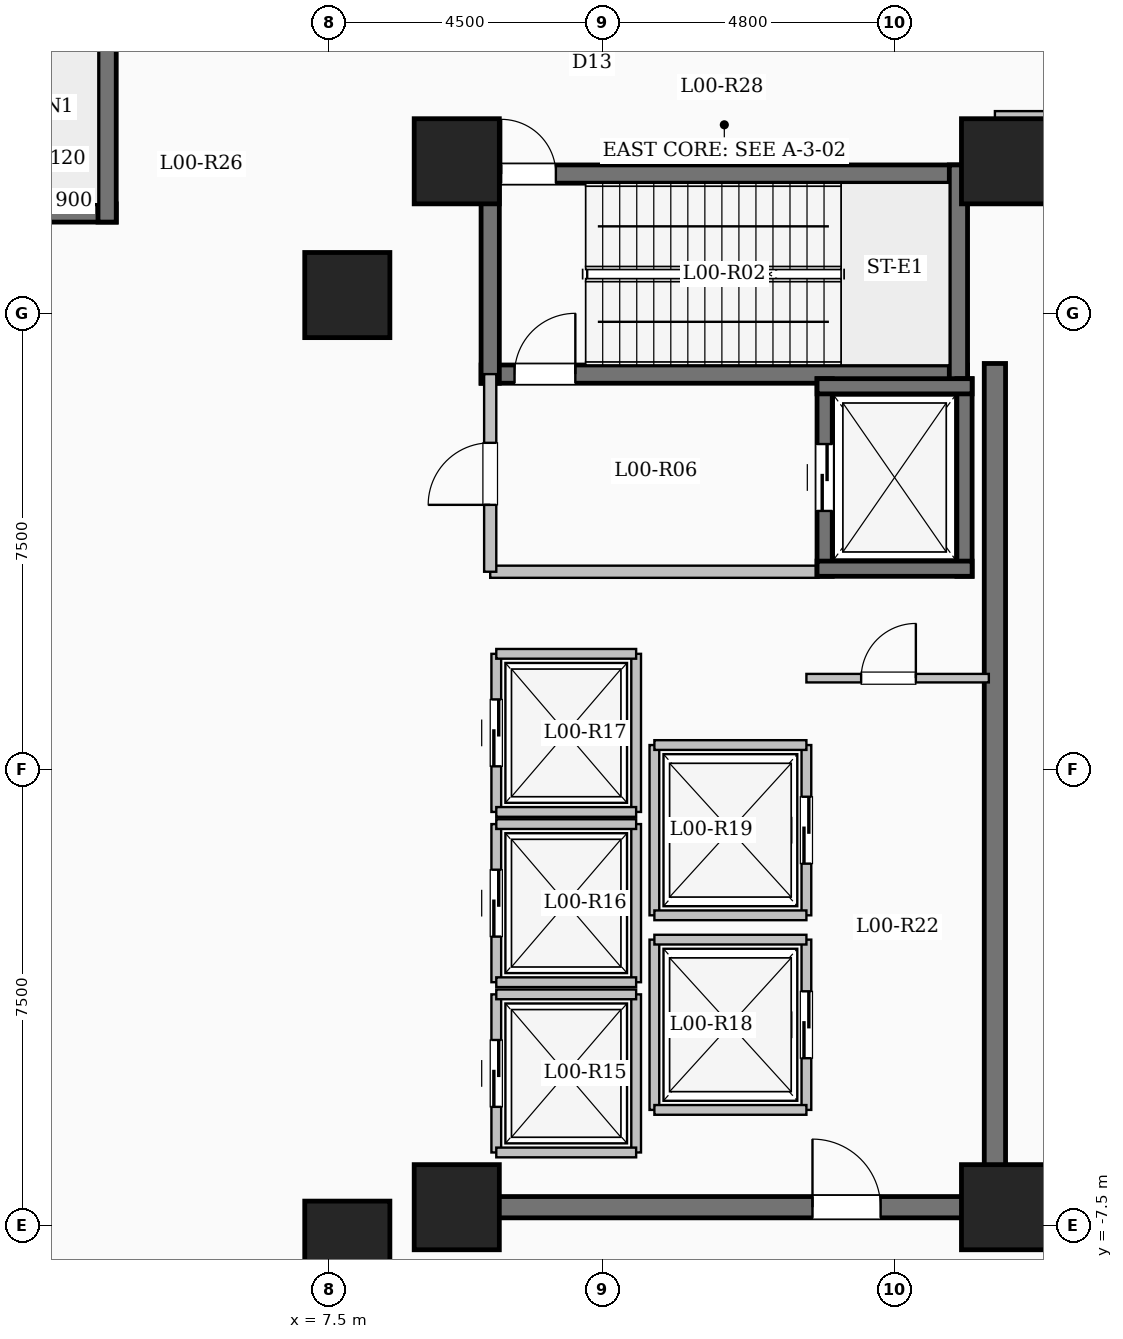
"""IFC4 building model, lengths in metres.
Left out: names, types, materials, properties, quantities, classifications, styles, units other than length and angle.
Written with IfcOpenShell. Run it as: python <this file> out.ifc"""

import sys

from ifc_helpers import new_model, si_unit, direction, frame, frame_2d, origin, origin_2d, place, context, subcontext, project, spatial, rectangle, extrude, element, fill, save


model = new_model("IFC4")
c1 = context("Model", 3, precision=1e-05, world=origin(), true_north=direction((0.0, 1.0)))
c2 = subcontext(c1, "Body", "Model", "MODEL_VIEW")
j1 = project(units=[si_unit("LENGTHUNIT", "METRE"), si_unit("PLANEANGLEUNIT", "RADIAN")], contexts=[c1])
p1 = place(None, origin())
s1 = spatial("IfcSite", under=j1, at=p1, CompositionType="ELEMENT")
p2 = place(p1, origin())
s2 = spatial("IfcBuilding", under=s1, at=p2, CompositionType="ELEMENT")
p3 = place(p2, origin())
s3 = spatial("IfcBuildingStorey", under=s2, at=p3, CompositionType="ELEMENT", Elevation=0.0)
for number, where, z_axis, x_axis in (
    (1, (7.8, -7.8, 0.0), (0.0, 0.0, 1.0), (1.0, 0.0, 0.0)),
    (2, (7.8, 7.8, 0.0), (0.0, 0.0, 1.0), (1.0, 0.0, 0.0)),
    (3, (9.6, -7.2, 0.0), (0.0, 0.0, 1.0), (1.0, 0.0, 0.0)),
    (4, (9.6, 10.0, 0.0), (0.0, 0.0, 1.0), (1.0, 0.0, 0.0)),
    (5, (18.6, -7.2, 0.0), (0.0, 0.0, 1.0), (1.0, 0.0, 0.0)),
    (6, (18.6, 10.0, 0.0), (0.0, 0.0, 1.0), (1.0, 0.0, 0.0)),
):
    element("IfcColumn", number, at=place(p3, frame(where, z_axis=z_axis, x_axis=x_axis)), inside=s3, PredefinedType="COLUMN", context=c2, shape_type="SweptSolid", body=[
        extrude(rectangle(XDim=1.4, YDim=1.4, at=origin_2d()), origin(), (0.0, 0.0, 1.0), 5.4),
    ])
p4 = place(p3, frame((10.0, 9.79, 0.0), z_axis=(0.0, 0.0, 1.0), x_axis=(1.0, 0.0, 0.0)))
e7 = element("IfcWall", 7, at=p4, inside=s3, PredefinedType="SHEAR", context=c2, shape_type="SweptSolid", body=[
    extrude(rectangle(XDim=8.0, YDim=0.3, at=frame_2d((4.0, 0.0))), origin(), (0.0, 0.0, 1.0), 5.4),
])
p5 = place(p4, frame((0.33, 0.0, 0.0)))
e8 = element("IfcOpeningElement", 8, at=p5, cuts=e7, PredefinedType="OPENING", context=c2, shape_type="SweptSolid", body=[
    extrude(rectangle(XDim=0.9, YDim=2.15, at=frame_2d((0.45, 1.075))), frame((0.0, 0.16, 0.0), z_axis=(0.0, -1.0, 0.0), x_axis=(1.0, 0.0, 0.0)), (0.0, 0.0, 1.0), 0.32),
])
p6 = place(p3, frame((10.0, 6.5, 0.0), z_axis=(0.0, 0.0, 1.0), x_axis=(1.0, 0.0, 0.0)))
e9 = element("IfcWall", 9, at=p6, inside=s3, PredefinedType="SHEAR", context=c2, shape_type="SweptSolid", body=[
    extrude(rectangle(XDim=8.0, YDim=0.3, at=frame_2d((4.0, 0.0))), origin(), (0.0, 0.0, 1.0), 5.4),
])
p7 = place(p6, frame((0.55, 0.0, 0.0)))
e10 = element("IfcOpeningElement", 10, at=p7, cuts=e9, PredefinedType="OPENING", context=c2, shape_type="SweptSolid", body=[
    extrude(rectangle(XDim=1.0, YDim=2.15, at=frame_2d((0.5, 1.075))), frame((0.0, 0.16, 0.0), z_axis=(0.0, -1.0, 0.0), x_axis=(1.0, 0.0, 0.0)), (0.0, 0.0, 1.0), 0.32),
])
for number, where, z_axis, x_axis in (
    (11, (10.15, 6.35, 0.0), (0.0, 0.0, 1.0), (0.0, 1.0, 0.0)),
    (12, (17.85, 6.35, 0.0), (0.0, 0.0, 1.0), (0.0, 1.0, 0.0)),
):
    element("IfcWall", number, at=place(p3, frame(where, z_axis=z_axis, x_axis=x_axis)), inside=s3, PredefinedType="SHEAR", context=c2, shape_type="SweptSolid", body=[
        extrude(rectangle(XDim=3.59, YDim=0.3, at=frame_2d((1.795, 0.0))), origin(), (0.0, 0.0, 1.0), 5.4),
    ])
p8 = place(p3, frame((-4.0, 9.15, 0.0), z_axis=(0.0, 0.0, 1.0), x_axis=(1.0, 0.0, 0.0)))
e13 = element("IfcWall", 13, at=p8, inside=s3, PredefinedType="SHEAR", context=c2, shape_type="SweptSolid", body=[
    extrude(rectangle(XDim=8.0, YDim=0.3, at=frame_2d((4.0, 0.0))), origin(), (0.0, 0.0, 1.0), 5.4),
])
p9 = place(p8, frame((0.55, 0.0, 0.0)))
e14 = element("IfcOpeningElement", 14, at=p9, cuts=e13, PredefinedType="OPENING", context=c2, shape_type="SweptSolid", body=[
    extrude(rectangle(XDim=1.0, YDim=2.15, at=frame_2d((0.5, 1.075))), frame((0.0, 0.16, 0.0), z_axis=(0.0, -1.0, 0.0), x_axis=(1.0, 0.0, 0.0)), (0.0, 0.0, 1.0), 0.32),
])
p10 = place(p3, frame((3.85, 9.0, 0.0), z_axis=(0.0, 0.0, 1.0), x_axis=(0.0, 1.0, 0.0)))
e15 = element("IfcWall", 15, at=p10, inside=s3, PredefinedType="SHEAR", context=c2, shape_type="SweptSolid", body=[
    extrude(rectangle(XDim=3.59, YDim=0.3, at=frame_2d((1.795, 0.0))), origin(), (0.0, 0.0, 1.0), 5.4),
])
p11 = place(p3, frame((10.15, 3.25, 0.0), z_axis=(0.0, 0.0, 1.0), x_axis=(1.0, 0.0, 0.0)))
e16 = element("IfcWall", 16, at=p11, inside=s3, PredefinedType="SOLIDWALL", context=c2, shape_type="SweptSolid", body=[
    extrude(rectangle(XDim=5.4, YDim=0.2, at=frame_2d((2.7, 0.0))), origin(), (0.0, 0.0, 1.0), 5.1),
])
p12 = place(p3, frame((10.15, 3.25, 0.0), z_axis=(0.0, 0.0, 1.0), x_axis=(0.0, 1.0, 0.0)))
e17 = element("IfcWall", 17, at=p12, inside=s3, PredefinedType="SOLIDWALL", context=c2, shape_type="SweptSolid", body=[
    extrude(rectangle(XDim=3.25, YDim=0.2, at=frame_2d((1.625, 0.0))), origin(), (0.0, 0.0, 1.0), 5.1),
])
p13 = place(p12, frame((1.1, 0.0, 0.0)))
e18 = element("IfcOpeningElement", 18, at=p13, cuts=e17, PredefinedType="OPENING", context=c2, shape_type="SweptSolid", body=[
    extrude(rectangle(XDim=1.02, YDim=2.15, at=frame_2d((0.51, 1.075))), frame((0.0, 0.11, 0.0), z_axis=(0.0, -1.0, 0.0), x_axis=(1.0, 0.0, 0.0)), (0.0, 0.0, 1.0), 0.22),
])
p14 = place(p3, frame((15.65, 3.175, 0.0), z_axis=(0.0, 0.0, 1.0), x_axis=(0.0, 1.0, 0.0)))
e19 = element("IfcWall", 19, at=p14, inside=s3, PredefinedType="SHEAR", context=c2, shape_type="SweptSolid", body=[
    extrude(rectangle(XDim=3.25, YDim=0.25, at=frame_2d((1.625, 0.0))), origin(), (0.0, 0.0, 1.0), 5.4),
])
p15 = place(p14, frame((1.075, 0.0, 0.0)))
e20 = element("IfcOpeningElement", 20, at=p15, cuts=e19, PredefinedType="OPENING", context=c2, shape_type="SweptSolid", body=[
    extrude(rectangle(XDim=1.1, YDim=2.15, at=frame_2d((0.55, 1.075))), frame((0.0, 0.135, 0.0), z_axis=(0.0, -1.0, 0.0), x_axis=(1.0, 0.0, 0.0)), (0.0, 0.0, 1.0), 0.27),
])
p16 = place(p3, frame((17.95, 3.175, 0.0), z_axis=(0.0, 0.0, 1.0), x_axis=(0.0, 1.0, 0.0)))
e21 = element("IfcWall", 21, at=p16, inside=s3, PredefinedType="SHEAR", context=c2, shape_type="SweptSolid", body=[
    extrude(rectangle(XDim=3.25, YDim=0.25, at=frame_2d((1.625, 0.0))), origin(), (0.0, 0.0, 1.0), 5.4),
])
for number, where, z_axis, x_axis in (
    (22, (15.525, 3.3, 0.0), (0.0, 0.0, 1.0), (1.0, 0.0, 0.0)),
    (23, (15.525, 6.3, 0.0), (0.0, 0.0, 1.0), (1.0, 0.0, 0.0)),
):
    element("IfcWall", number, at=place(p3, frame(where, z_axis=z_axis, x_axis=x_axis)), inside=s3, PredefinedType="SHEAR", context=c2, shape_type="SweptSolid", body=[
        extrude(rectangle(XDim=2.55, YDim=0.25, at=frame_2d((1.275, 0.0))), origin(), (0.0, 0.0, 1.0), 5.4),
    ])
p17 = place(p3, frame((10.25, -6.3, 0.0), z_axis=(0.0, 0.0, 1.0), x_axis=(0.0, 1.0, 0.0)))
e24 = element("IfcWall", 24, at=p17, inside=s3, PredefinedType="SOLIDWALL", context=c2, shape_type="SweptSolid", body=[
    extrude(rectangle(XDim=2.6, YDim=0.16, at=frame_2d((1.3, 0.0))), origin(), (0.0, 0.0, 1.0), 5.1),
])
p18 = place(p17, frame((0.75, 0.0, 0.0)))
e25 = element("IfcOpeningElement", 25, at=p18, cuts=e24, PredefinedType="OPENING", context=c2, shape_type="SweptSolid", body=[
    extrude(rectangle(XDim=1.1, YDim=2.15, at=frame_2d((0.55, 1.075))), frame((0.0, 0.09, 0.0), z_axis=(0.0, -1.0, 0.0), x_axis=(1.0, 0.0, 0.0)), (0.0, 0.0, 1.0), 0.18),
])
p19 = place(p3, frame((12.55, -6.3, 0.0), z_axis=(0.0, 0.0, 1.0), x_axis=(0.0, 1.0, 0.0)))
e26 = element("IfcWall", 26, at=p19, inside=s3, PredefinedType="SOLIDWALL", context=c2, shape_type="SweptSolid", body=[
    extrude(rectangle(XDim=2.6, YDim=0.16, at=frame_2d((1.3, 0.0))), origin(), (0.0, 0.0, 1.0), 5.1),
])
for number, where, z_axis, x_axis in (
    (27, (10.25, -6.3, 0.0), (0.0, 0.0, 1.0), (1.0, 0.0, 0.0)),
    (28, (10.25, -3.7, 0.0), (0.0, 0.0, 1.0), (1.0, 0.0, 0.0)),
):
    element("IfcWall", number, at=place(p3, frame(where, z_axis=z_axis, x_axis=x_axis)), inside=s3, PredefinedType="SOLIDWALL", context=c2, shape_type="SweptSolid", body=[
        extrude(rectangle(XDim=2.3, YDim=0.16, at=frame_2d((1.15, 0.0))), origin(), (0.0, 0.0, 1.0), 5.1),
    ])
p20 = place(p3, frame((10.25, -3.5, 0.0), z_axis=(0.0, 0.0, 1.0), x_axis=(0.0, 1.0, 0.0)))
e29 = element("IfcWall", 29, at=p20, inside=s3, PredefinedType="SOLIDWALL", context=c2, shape_type="SweptSolid", body=[
    extrude(rectangle(XDim=2.6, YDim=0.16, at=frame_2d((1.3, 0.0))), origin(), (0.0, 0.0, 1.0), 5.1),
])
p21 = place(p20, frame((0.75, 0.0, 0.0)))
e30 = element("IfcOpeningElement", 30, at=p21, cuts=e29, PredefinedType="OPENING", context=c2, shape_type="SweptSolid", body=[
    extrude(rectangle(XDim=1.1, YDim=2.15, at=frame_2d((0.55, 1.075))), frame((0.0, 0.09, 0.0), z_axis=(0.0, -1.0, 0.0), x_axis=(1.0, 0.0, 0.0)), (0.0, 0.0, 1.0), 0.18),
])
p22 = place(p3, frame((12.55, -3.5, 0.0), z_axis=(0.0, 0.0, 1.0), x_axis=(0.0, 1.0, 0.0)))
e31 = element("IfcWall", 31, at=p22, inside=s3, PredefinedType="SOLIDWALL", context=c2, shape_type="SweptSolid", body=[
    extrude(rectangle(XDim=2.6, YDim=0.16, at=frame_2d((1.3, 0.0))), origin(), (0.0, 0.0, 1.0), 5.1),
])
for number, where, z_axis, x_axis in (
    (32, (10.25, -3.5, 0.0), (0.0, 0.0, 1.0), (1.0, 0.0, 0.0)),
    (33, (10.25, -0.9, 0.0), (0.0, 0.0, 1.0), (1.0, 0.0, 0.0)),
):
    element("IfcWall", number, at=place(p3, frame(where, z_axis=z_axis, x_axis=x_axis)), inside=s3, PredefinedType="SOLIDWALL", context=c2, shape_type="SweptSolid", body=[
        extrude(rectangle(XDim=2.3, YDim=0.16, at=frame_2d((1.15, 0.0))), origin(), (0.0, 0.0, 1.0), 5.1),
    ])
p23 = place(p3, frame((10.25, -0.7, 0.0), z_axis=(0.0, 0.0, 1.0), x_axis=(0.0, 1.0, 0.0)))
e34 = element("IfcWall", 34, at=p23, inside=s3, PredefinedType="SOLIDWALL", context=c2, shape_type="SweptSolid", body=[
    extrude(rectangle(XDim=2.6, YDim=0.16, at=frame_2d((1.3, 0.0))), origin(), (0.0, 0.0, 1.0), 5.1),
])
p24 = place(p23, frame((0.75, 0.0, 0.0)))
e35 = element("IfcOpeningElement", 35, at=p24, cuts=e34, PredefinedType="OPENING", context=c2, shape_type="SweptSolid", body=[
    extrude(rectangle(XDim=1.1, YDim=2.15, at=frame_2d((0.55, 1.075))), frame((0.0, 0.09, 0.0), z_axis=(0.0, -1.0, 0.0), x_axis=(1.0, 0.0, 0.0)), (0.0, 0.0, 1.0), 0.18),
])
p25 = place(p3, frame((12.55, -0.7, 0.0), z_axis=(0.0, 0.0, 1.0), x_axis=(0.0, 1.0, 0.0)))
e36 = element("IfcWall", 36, at=p25, inside=s3, PredefinedType="SOLIDWALL", context=c2, shape_type="SweptSolid", body=[
    extrude(rectangle(XDim=2.6, YDim=0.16, at=frame_2d((1.3, 0.0))), origin(), (0.0, 0.0, 1.0), 5.1),
])
for number, where, z_axis, x_axis in (
    (37, (10.25, -0.7, 0.0), (0.0, 0.0, 1.0), (1.0, 0.0, 0.0)),
    (38, (10.25, 1.9, 0.0), (0.0, 0.0, 1.0), (1.0, 0.0, 0.0)),
):
    element("IfcWall", number, at=place(p3, frame(where, z_axis=z_axis, x_axis=x_axis)), inside=s3, PredefinedType="SOLIDWALL", context=c2, shape_type="SweptSolid", body=[
        extrude(rectangle(XDim=2.3, YDim=0.16, at=frame_2d((1.15, 0.0))), origin(), (0.0, 0.0, 1.0), 5.1),
    ])
p26 = place(p3, frame((12.85, -5.6, 0.0), z_axis=(0.0, 0.0, 1.0), x_axis=(0.0, 1.0, 0.0)))
e39 = element("IfcWall", 39, at=p26, inside=s3, PredefinedType="SOLIDWALL", context=c2, shape_type="SweptSolid", body=[
    extrude(rectangle(XDim=2.8, YDim=0.16, at=frame_2d((1.4, 0.0))), origin(), (0.0, 0.0, 1.0), 5.1),
])
p27 = place(p3, frame((15.35, -5.6, 0.0), z_axis=(0.0, 0.0, 1.0), x_axis=(0.0, 1.0, 0.0)))
e40 = element("IfcWall", 40, at=p27, inside=s3, PredefinedType="SOLIDWALL", context=c2, shape_type="SweptSolid", body=[
    extrude(rectangle(XDim=2.8, YDim=0.16, at=frame_2d((1.4, 0.0))), origin(), (0.0, 0.0, 1.0), 5.1),
])
p28 = place(p27, frame((0.85, 0.0, 0.0)))
e41 = element("IfcOpeningElement", 41, at=p28, cuts=e40, PredefinedType="OPENING", context=c2, shape_type="SweptSolid", body=[
    extrude(rectangle(XDim=1.1, YDim=2.15, at=frame_2d((0.55, 1.075))), frame((0.0, 0.09, 0.0), z_axis=(0.0, -1.0, 0.0), x_axis=(1.0, 0.0, 0.0)), (0.0, 0.0, 1.0), 0.18),
])
for number, where, z_axis, x_axis in (
    (42, (12.85, -5.6, 0.0), (0.0, 0.0, 1.0), (1.0, 0.0, 0.0)),
    (43, (12.85, -2.8, 0.0), (0.0, 0.0, 1.0), (1.0, 0.0, 0.0)),
):
    element("IfcWall", number, at=place(p3, frame(where, z_axis=z_axis, x_axis=x_axis)), inside=s3, PredefinedType="SOLIDWALL", context=c2, shape_type="SweptSolid", body=[
        extrude(rectangle(XDim=2.5, YDim=0.16, at=frame_2d((1.25, 0.0))), origin(), (0.0, 0.0, 1.0), 5.1),
    ])
p29 = place(p3, frame((12.85, -2.4, 0.0), z_axis=(0.0, 0.0, 1.0), x_axis=(0.0, 1.0, 0.0)))
e44 = element("IfcWall", 44, at=p29, inside=s3, PredefinedType="SOLIDWALL", context=c2, shape_type="SweptSolid", body=[
    extrude(rectangle(XDim=2.8, YDim=0.16, at=frame_2d((1.4, 0.0))), origin(), (0.0, 0.0, 1.0), 5.1),
])
p30 = place(p3, frame((15.35, -2.4, 0.0), z_axis=(0.0, 0.0, 1.0), x_axis=(0.0, 1.0, 0.0)))
e45 = element("IfcWall", 45, at=p30, inside=s3, PredefinedType="SOLIDWALL", context=c2, shape_type="SweptSolid", body=[
    extrude(rectangle(XDim=2.8, YDim=0.16, at=frame_2d((1.4, 0.0))), origin(), (0.0, 0.0, 1.0), 5.1),
])
p31 = place(p30, frame((0.85, 0.0, 0.0)))
e46 = element("IfcOpeningElement", 46, at=p31, cuts=e45, PredefinedType="OPENING", context=c2, shape_type="SweptSolid", body=[
    extrude(rectangle(XDim=1.1, YDim=2.15, at=frame_2d((0.55, 1.075))), frame((0.0, 0.09, 0.0), z_axis=(0.0, -1.0, 0.0), x_axis=(1.0, 0.0, 0.0)), (0.0, 0.0, 1.0), 0.18),
])
for number, where, z_axis, x_axis in (
    (47, (12.85, -2.4, 0.0), (0.0, 0.0, 1.0), (1.0, 0.0, 0.0)),
    (48, (12.85, 0.4, 0.0), (0.0, 0.0, 1.0), (1.0, 0.0, 0.0)),
):
    element("IfcWall", number, at=place(p3, frame(where, z_axis=z_axis, x_axis=x_axis)), inside=s3, PredefinedType="SOLIDWALL", context=c2, shape_type="SweptSolid", body=[
        extrude(rectangle(XDim=2.5, YDim=0.16, at=frame_2d((1.25, 0.0))), origin(), (0.0, 0.0, 1.0), 5.1),
    ])
p32 = place(p3, frame((18.45, -7.375, 0.0), z_axis=(0.0, 0.0, 1.0), x_axis=(0.0, 1.0, 0.0)))
e49 = element("IfcWall", 49, at=p32, inside=s3, PredefinedType="SHEAR", context=c2, shape_type="SweptSolid", body=[
    extrude(rectangle(XDim=14.05, YDim=0.35, at=frame_2d((7.025, 0.0))), origin(), (0.0, 0.0, 1.0), 5.4),
])
p33 = place(p3, frame((10.075, -7.2, 0.0), z_axis=(0.0, 0.0, 1.0), x_axis=(1.0, 0.0, 0.0)))
e50 = element("IfcWall", 50, at=p33, inside=s3, PredefinedType="SHEAR", context=c2, shape_type="SweptSolid", body=[
    extrude(rectangle(XDim=8.55, YDim=0.35, at=frame_2d((4.275, 0.0))), origin(), (0.0, 0.0, 1.0), 5.4),
])
p34 = place(p33, frame((5.375, 0.0, 0.0)))
e51 = element("IfcOpeningElement", 51, at=p34, cuts=e50, PredefinedType="OPENING", context=c2, shape_type="SweptSolid", body=[
    extrude(rectangle(XDim=1.12, YDim=2.15, at=frame_2d((0.56, 1.075))), frame((0.0, 0.185, 0.0), z_axis=(0.0, -1.0, 0.0), x_axis=(1.0, 0.0, 0.0)), (0.0, 0.0, 1.0), 0.37),
])
p35 = place(p3, frame((15.35, 1.5, 0.0), z_axis=(0.0, 0.0, 1.0), x_axis=(1.0, 0.0, 0.0)))
e52 = element("IfcWall", 52, at=p35, inside=s3, PredefinedType="PARTITIONING", context=c2, shape_type="SweptSolid", body=[
    extrude(rectangle(XDim=3.0, YDim=0.14, at=frame_2d((1.5, 0.0))), origin(), (0.0, 0.0, 1.0), 5.1),
])
p36 = place(p35, frame((0.9, 0.0, 0.0)))
e53 = element("IfcOpeningElement", 53, at=p36, cuts=e52, PredefinedType="OPENING", context=c2, shape_type="SweptSolid", body=[
    extrude(rectangle(XDim=0.9, YDim=2.08, at=frame_2d((0.45, 1.04))), frame((0.0, 0.08, 0.0), z_axis=(0.0, -1.0, 0.0), x_axis=(1.0, 0.0, 0.0)), (0.0, 0.0, 1.0), 0.16),
])
p37 = place(p3, frame((18.45, -7.25, 0.0), z_axis=(0.0, 0.0, 1.0), x_axis=(1.0, 0.0, 0.0)))
e54 = element("IfcWall", 54, at=p37, inside=s3, PredefinedType="PARTITIONING", context=c2, shape_type="SweptSolid", body=[
    extrude(rectangle(XDim=14.43, YDim=0.15, at=frame_2d((7.215, 0.0))), origin(), (0.0, 0.0, 1.0), 5.1),
])
p38 = place(p37, frame((3.2, 0.0, 0.0)))
e55 = element("IfcOpeningElement", 55, at=p38, cuts=e54, PredefinedType="OPENING", context=c2, shape_type="SweptSolid", body=[
    extrude(rectangle(XDim=1.2, YDim=2.2, at=frame_2d((0.6, 1.1))), frame((0.0, 0.085, 0.0), z_axis=(0.0, -1.0, 0.0), x_axis=(1.0, 0.0, 0.0)), (0.0, 0.0, 1.0), 0.17),
])
p39 = place(p3, frame((18.45, 10.75, 0.0), z_axis=(0.0, 0.0, 1.0), x_axis=(1.0, 0.0, 0.0)))
e56 = element("IfcWall", 56, at=p39, inside=s3, PredefinedType="PARTITIONING", context=c2, shape_type="SweptSolid", body=[
    extrude(rectangle(XDim=14.43, YDim=0.15, at=frame_2d((7.215, 0.0))), origin(), (0.0, 0.0, 1.0), 5.1),
])
p40 = place(p7, origin())
e57 = element("IfcDoor", 57, at=p40, inside=s3, OperationType="SINGLE_SWING_RIGHT", PredefinedType="DOOR", context=c2, shape_type="SweptSolid", body=[
    extrude(rectangle(XDim=1.0, YDim=2.15, at=frame_2d((0.5, 1.075))), frame((0.0, 0.025, 0.0), z_axis=(0.0, -1.0, 0.0), x_axis=(1.0, 0.0, 0.0)), (0.0, 0.0, 1.0), 0.05),
])
fill(e10, e57)
p41 = place(p5, origin())
e58 = element("IfcDoor", 58, at=p41, inside=s3, OperationType="SINGLE_SWING_LEFT", PredefinedType="DOOR", context=c2, shape_type="SweptSolid", body=[
    extrude(rectangle(XDim=0.9, YDim=2.15, at=frame_2d((0.45, 1.075))), frame((0.0, 0.025, 0.0), z_axis=(0.0, -1.0, 0.0), x_axis=(1.0, 0.0, 0.0)), (0.0, 0.0, 1.0), 0.05),
])
fill(e8, e58)
p42 = place(p13, origin())
e59 = element("IfcDoor", 59, at=p42, inside=s3, OperationType="SINGLE_SWING_LEFT", PredefinedType="DOOR", context=c2, shape_type="SweptSolid", body=[
    extrude(rectangle(XDim=1.02, YDim=2.15, at=frame_2d((0.51, 1.075))), frame((0.0, 0.025, 0.0), z_axis=(0.0, -1.0, 0.0), x_axis=(1.0, 0.0, 0.0)), (0.0, 0.0, 1.0), 0.05),
])
fill(e18, e59)
p43 = place(p15, origin())
e60 = element("IfcDoor", 60, at=p43, inside=s3, OperationType="SLIDING_TO_LEFT", PredefinedType="DOOR", context=c2, shape_type="SweptSolid", body=[
    extrude(rectangle(XDim=1.1, YDim=2.15, at=frame_2d((0.55, 1.075))), frame((0.0, 0.025, 0.0), z_axis=(0.0, -1.0, 0.0), x_axis=(1.0, 0.0, 0.0)), (0.0, 0.0, 1.0), 0.05),
])
fill(e20, e60)
p44 = place(p18, origin())
e61 = element("IfcDoor", 61, at=p44, inside=s3, OperationType="SLIDING_TO_LEFT", PredefinedType="DOOR", context=c2, shape_type="SweptSolid", body=[
    extrude(rectangle(XDim=1.1, YDim=2.15, at=frame_2d((0.55, 1.075))), frame((0.0, 0.025, 0.0), z_axis=(0.0, -1.0, 0.0), x_axis=(1.0, 0.0, 0.0)), (0.0, 0.0, 1.0), 0.05),
])
fill(e25, e61)
p45 = place(p21, origin())
e62 = element("IfcDoor", 62, at=p45, inside=s3, OperationType="SLIDING_TO_LEFT", PredefinedType="DOOR", context=c2, shape_type="SweptSolid", body=[
    extrude(rectangle(XDim=1.1, YDim=2.15, at=frame_2d((0.55, 1.075))), frame((0.0, 0.025, 0.0), z_axis=(0.0, -1.0, 0.0), x_axis=(1.0, 0.0, 0.0)), (0.0, 0.0, 1.0), 0.05),
])
fill(e30, e62)
p46 = place(p24, origin())
e63 = element("IfcDoor", 63, at=p46, inside=s3, OperationType="SLIDING_TO_LEFT", PredefinedType="DOOR", context=c2, shape_type="SweptSolid", body=[
    extrude(rectangle(XDim=1.1, YDim=2.15, at=frame_2d((0.55, 1.075))), frame((0.0, 0.025, 0.0), z_axis=(0.0, -1.0, 0.0), x_axis=(1.0, 0.0, 0.0)), (0.0, 0.0, 1.0), 0.05),
])
fill(e35, e63)
p47 = place(p28, origin())
e64 = element("IfcDoor", 64, at=p47, inside=s3, OperationType="SLIDING_TO_LEFT", PredefinedType="DOOR", context=c2, shape_type="SweptSolid", body=[
    extrude(rectangle(XDim=1.1, YDim=2.15, at=frame_2d((0.55, 1.075))), frame((0.0, 0.025, 0.0), z_axis=(0.0, -1.0, 0.0), x_axis=(1.0, 0.0, 0.0)), (0.0, 0.0, 1.0), 0.05),
])
fill(e41, e64)
p48 = place(p31, origin())
e65 = element("IfcDoor", 65, at=p48, inside=s3, OperationType="SLIDING_TO_LEFT", PredefinedType="DOOR", context=c2, shape_type="SweptSolid", body=[
    extrude(rectangle(XDim=1.1, YDim=2.15, at=frame_2d((0.55, 1.075))), frame((0.0, 0.025, 0.0), z_axis=(0.0, -1.0, 0.0), x_axis=(1.0, 0.0, 0.0)), (0.0, 0.0, 1.0), 0.05),
])
fill(e46, e65)
p49 = place(p34, origin())
e66 = element("IfcDoor", 66, at=p49, inside=s3, OperationType="SINGLE_SWING_LEFT", PredefinedType="DOOR", context=c2, shape_type="SweptSolid", body=[
    extrude(rectangle(XDim=1.12, YDim=2.15, at=frame_2d((0.56, 1.075))), frame((0.0, 0.025, 0.0), z_axis=(0.0, -1.0, 0.0), x_axis=(1.0, 0.0, 0.0)), (0.0, 0.0, 1.0), 0.05),
])
fill(e51, e66)
p50 = place(p36, origin())
e67 = element("IfcDoor", 67, at=p50, inside=s3, OperationType="SINGLE_SWING_RIGHT", PredefinedType="DOOR", context=c2, shape_type="SweptSolid", body=[
    extrude(rectangle(XDim=0.9, YDim=2.08, at=frame_2d((0.45, 1.04))), frame((0.0, 0.025, 0.0), z_axis=(0.0, -1.0, 0.0), x_axis=(1.0, 0.0, 0.0)), (0.0, 0.0, 1.0), 0.05),
])
fill(e53, e67)
save(model, sys.argv[1])
